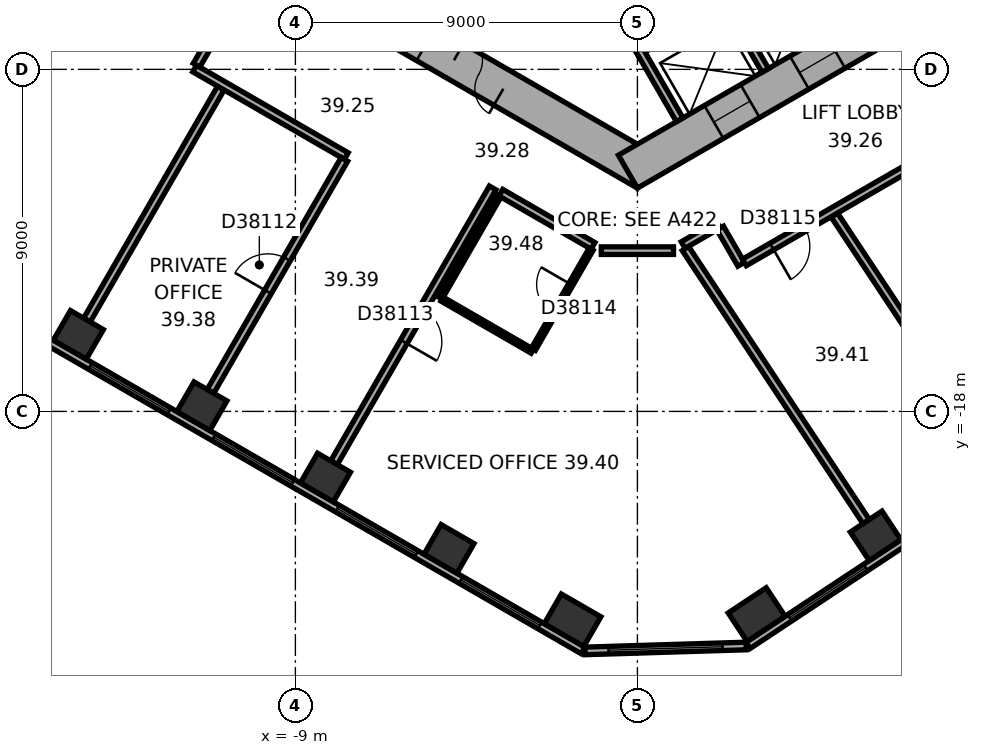
"""IFC4 building model, lengths in metres.
Left out: names, types, materials, properties, quantities, classifications, styles, units other than length and angle.
Written with IfcOpenShell. Run it as: python <this file> out.ifc"""

import sys

from ifc_helpers import new_model, si_unit, direction, frame, frame_2d, origin, origin_2d, place, context, subcontext, project, spatial, rectangle, extrude, element, fill, save


model = new_model("IFC4")
c1 = context("Model", 3, precision=1e-05, world=origin(), true_north=direction((0.0, 1.0)))
c2 = subcontext(c1, "Body", "Model", "MODEL_VIEW")
j1 = project(units=[si_unit("LENGTHUNIT", "METRE"), si_unit("PLANEANGLEUNIT", "RADIAN")], contexts=[c1])
p1 = place(None, origin())
s1 = spatial("IfcSite", under=j1, at=p1, CompositionType="ELEMENT")
p2 = place(p1, origin())
s2 = spatial("IfcBuilding", under=s1, at=p2, CompositionType="ELEMENT")
p3 = place(p2, frame((0.0, 0.0, 161.4)))
s3 = spatial("IfcBuildingStorey", under=s2, at=p3, CompositionType="ELEMENT", Elevation=161.4)
for number, where, z_axis, x_axis in (
    (1, (-14.711, -15.986, 0.0), (0.0, 0.0, 1.0), (0.866, -0.5, 0.0)),
    (2, (-11.46, -17.863, 0.0), (0.0, 0.0, 1.0), (0.866, -0.5, 0.0)),
    (3, (-8.208, -19.74, 0.0), (0.0, 0.0, 1.0), (0.866, -0.5, 0.0)),
    (4, (-4.958, -21.617, 0.0), (0.0, 0.0, 1.0), (0.866, -0.5, 0.0)),
):
    element("IfcColumn", number, at=place(p3, frame(where, z_axis=z_axis, x_axis=x_axis)), inside=s3, PredefinedType="COLUMN", context=c2, shape_type="SweptSolid", body=[
        extrude(rectangle(XDim=1.0, YDim=0.9, at=origin_2d()), origin(), (0.0, 0.0, 1.0), 3.7),
    ])
for number, where, z_axis, x_axis in (
    (5, (-1.706, -23.494, 0.0), (0.0, 0.0, 1.0), (0.866, -0.5, 0.0)),
    (6, (3.137, -23.346, 0.0), (0.0, 0.0, 1.0), (0.834, 0.552, 0.0)),
):
    element("IfcColumn", number, at=place(p3, frame(where, z_axis=z_axis, x_axis=x_axis)), inside=s3, PredefinedType="COLUMN", context=c2, shape_type="SweptSolid", body=[
        extrude(rectangle(XDim=1.2, YDim=0.9, at=origin_2d()), origin(), (0.0, 0.0, 1.0), 3.7),
    ])
p4 = place(p3, frame((6.268, -21.274, 0.0), z_axis=(0.0, 0.0, 1.0), x_axis=(0.833885822067, 0.551936985312, 0.0)))
e7 = element("IfcColumn", 7, at=p4, inside=s3, PredefinedType="COLUMN", context=c2, shape_type="SweptSolid", body=[
    extrude(rectangle(XDim=1.0, YDim=0.9, at=origin_2d()), origin(), (0.0, 0.0, 1.0), 3.7),
])
p5 = place(p3, frame((-10.25, -5.629, 0.0), z_axis=(0.0, 0.0, 1.0), x_axis=(0.866022616891, -0.50000482701, 0.0)))
e8 = element("IfcWall", 8, at=p5, inside=s3, PredefinedType="SHEAR", context=c2, shape_type="SweptSolid", body=[
    extrude(rectangle(XDim=12.125, YDim=1.0, at=frame_2d((6.062, 0.0))), origin(), (0.0, 0.0, 1.0), 3.7),
])
p6 = place(p5, frame((6.262, 0.0, 0.0)))
e9 = element("IfcOpeningElement", 9, at=p6, cuts=e8, PredefinedType="OPENING", context=c2, shape_type="SweptSolid", body=[
    extrude(rectangle(XDim=1.5, YDim=2.1, at=frame_2d((0.75, 1.05))), frame((0.0, 0.51, 0.0), z_axis=(0.0, -1.0, 0.0), x_axis=(1.0, 0.0, 0.0)), (0.0, 0.0, 1.0), 1.02),
])
p7 = place(p5, frame((1.712, 0.0, 0.0)))
e10 = element("IfcOpeningElement", 10, at=p7, cuts=e8, PredefinedType="OPENING", context=c2, shape_type="SweptSolid", body=[
    extrude(rectangle(XDim=1.1, YDim=2.1, at=frame_2d((0.55, 1.05))), frame((0.0, 0.51, 0.0), z_axis=(0.0, -1.0, 0.0), x_axis=(1.0, 0.0, 0.0)), (0.0, 0.0, 1.0), 1.02),
])
p8 = place(p5, frame((4.312, 0.0, 0.0)))
e11 = element("IfcOpeningElement", 11, at=p8, cuts=e8, PredefinedType="OPENING", context=c2, shape_type="SweptSolid", body=[
    extrude(rectangle(XDim=1.1, YDim=2.1, at=frame_2d((0.55, 1.05))), frame((0.0, 0.51, 0.0), z_axis=(0.0, -1.0, 0.0), x_axis=(1.0, 0.0, 0.0)), (0.0, 0.0, 1.0), 1.02),
])
p9 = place(p3, frame((-0.25, -11.691, 0.0), z_axis=(0.0, 0.0, 1.0), x_axis=(0.866022616891, 0.50000482701, 0.0)))
e12 = element("IfcWall", 12, at=p9, inside=s3, PredefinedType="SHEAR", context=c2, shape_type="SweptSolid", body=[
    extrude(rectangle(XDim=12.125, YDim=1.0, at=frame_2d((6.062, 0.0))), origin(), (0.0, 0.0, 1.0), 3.7),
])
p10 = place(p9, frame((2.612, 0.0, 0.0)))
e13 = element("IfcOpeningElement", 13, at=p10, cuts=e12, PredefinedType="OPENING", context=c2, shape_type="SweptSolid", body=[
    extrude(rectangle(XDim=1.1, YDim=2.1, at=frame_2d((0.55, 1.05))), frame((0.0, 0.51, 0.0), z_axis=(0.0, -1.0, 0.0), x_axis=(1.0, 0.0, 0.0)), (0.0, 0.0, 1.0), 1.02),
])
p11 = place(p9, frame((5.212, 0.0, 0.0)))
e14 = element("IfcOpeningElement", 14, at=p11, cuts=e12, PredefinedType="OPENING", context=c2, shape_type="SweptSolid", body=[
    extrude(rectangle(XDim=1.1, YDim=2.1, at=frame_2d((0.55, 1.05))), frame((0.0, 0.51, 0.0), z_axis=(0.0, -1.0, 0.0), x_axis=(1.0, 0.0, 0.0)), (0.0, 0.0, 1.0), 1.02),
])
p12 = place(p9, frame((7.812, 0.0, 0.0)))
e15 = element("IfcOpeningElement", 15, at=p12, cuts=e12, PredefinedType="OPENING", context=c2, shape_type="SweptSolid", body=[
    extrude(rectangle(XDim=1.1, YDim=2.1, at=frame_2d((0.55, 1.05))), frame((0.0, 0.51, 0.0), z_axis=(0.0, -1.0, 0.0), x_axis=(1.0, 0.0, 0.0)), (0.0, 0.0, 1.0), 1.02),
])
p13 = place(p3, frame((-18.789, -14.267, 0.0), z_axis=(0.0, 0.0, 1.0), x_axis=(0.866023315909, -0.500003616288, 0.0)))
e16 = element("IfcWall", 16, at=p13, inside=s3, PredefinedType="STANDARD", context=c2, shape_type="SweptSolid", body=[
    extrude(rectangle(XDim=20.044, YDim=0.2, at=frame_2d((10.022, 0.0))), origin(), (0.0, 0.0, 1.0), 3.7),
])
p14 = place(p13, frame((1.314, 0.0, 0.9)))
e17 = element("IfcOpeningElement", 17, at=p14, cuts=e16, PredefinedType="OPENING", context=c2, shape_type="SweptSolid", body=[
    extrude(rectangle(XDim=2.4, YDim=2.0, at=frame_2d((1.2, 1.0))), frame((0.0, 0.11, 0.0), z_axis=(0.0, -1.0, 0.0), x_axis=(1.0, 0.0, 0.0)), (0.0, 0.0, 1.0), 0.22),
])
p15 = place(p13, frame((5.069, 0.0, 0.9)))
e18 = element("IfcOpeningElement", 18, at=p15, cuts=e16, PredefinedType="OPENING", context=c2, shape_type="SweptSolid", body=[
    extrude(rectangle(XDim=2.4, YDim=2.0, at=frame_2d((1.2, 1.0))), frame((0.0, 0.11, 0.0), z_axis=(0.0, -1.0, 0.0), x_axis=(1.0, 0.0, 0.0)), (0.0, 0.0, 1.0), 0.22),
])
p16 = place(p13, frame((8.823, 0.0, 0.9)))
e19 = element("IfcOpeningElement", 19, at=p16, cuts=e16, PredefinedType="OPENING", context=c2, shape_type="SweptSolid", body=[
    extrude(rectangle(XDim=2.4, YDim=2.0, at=frame_2d((1.2, 1.0))), frame((0.0, 0.11, 0.0), z_axis=(0.0, -1.0, 0.0), x_axis=(1.0, 0.0, 0.0)), (0.0, 0.0, 1.0), 0.22),
])
p17 = place(p13, frame((12.577, 0.0, 0.9)))
e20 = element("IfcOpeningElement", 20, at=p17, cuts=e16, PredefinedType="OPENING", context=c2, shape_type="SweptSolid", body=[
    extrude(rectangle(XDim=2.4, YDim=2.0, at=frame_2d((1.2, 1.0))), frame((0.0, 0.11, 0.0), z_axis=(0.0, -1.0, 0.0), x_axis=(1.0, 0.0, 0.0)), (0.0, 0.0, 1.0), 0.22),
])
p18 = place(p13, frame((16.331, 0.0, 0.9)))
e21 = element("IfcOpeningElement", 21, at=p18, cuts=e16, PredefinedType="OPENING", context=c2, shape_type="SweptSolid", body=[
    extrude(rectangle(XDim=2.4, YDim=2.0, at=frame_2d((1.2, 1.0))), frame((0.0, 0.11, 0.0), z_axis=(0.0, -1.0, 0.0), x_axis=(1.0, 0.0, 0.0)), (0.0, 0.0, 1.0), 0.22),
])
p19 = place(p3, frame((-1.378, -24.302, 0.0), z_axis=(0.0, 0.0, 1.0), x_axis=(0.999533857267, 0.030529791629, 0.0)))
e22 = element("IfcWall", 22, at=p19, inside=s3, PredefinedType="STANDARD", context=c2, shape_type="SweptSolid", body=[
    extrude(rectangle(XDim=4.238, YDim=0.2, at=frame_2d((2.119, 0.0))), origin(), (0.0, 0.0, 1.0), 3.7),
])
p20 = place(p19, frame((0.619, 0.0, 0.9)))
e23 = element("IfcOpeningElement", 23, at=p20, cuts=e22, PredefinedType="OPENING", context=c2, shape_type="SweptSolid", body=[
    extrude(rectangle(XDim=3.0, YDim=2.0, at=frame_2d((1.5, 1.0))), frame((0.0, 0.11, 0.0), z_axis=(0.0, -1.0, 0.0), x_axis=(1.0, 0.0, 0.0)), (0.0, 0.0, 1.0), 0.22),
])
p21 = place(p3, frame((2.911, -24.156, 0.0), z_axis=(0.0, 0.0, 1.0), x_axis=(0.833882163564, 0.551942512668, 0.0)))
e24 = element("IfcWall", 24, at=p21, inside=s3, PredefinedType="STANDARD", context=c2, shape_type="SweptSolid", body=[
    extrude(rectangle(XDim=20.044, YDim=0.2, at=frame_2d((10.022, 0.0))), origin(), (0.0, 0.0, 1.0), 3.7),
])
p22 = place(p21, frame((1.313, 0.0, 0.9)))
e25 = element("IfcOpeningElement", 25, at=p22, cuts=e24, PredefinedType="OPENING", context=c2, shape_type="SweptSolid", body=[
    extrude(rectangle(XDim=2.4, YDim=2.0, at=frame_2d((1.2, 1.0))), frame((0.0, 0.11, 0.0), z_axis=(0.0, -1.0, 0.0), x_axis=(1.0, 0.0, 0.0)), (0.0, 0.0, 1.0), 0.22),
])
p23 = place(p21, frame((5.067, 0.0, 0.9)))
e26 = element("IfcOpeningElement", 26, at=p23, cuts=e24, PredefinedType="OPENING", context=c2, shape_type="SweptSolid", body=[
    extrude(rectangle(XDim=2.4, YDim=2.0, at=frame_2d((1.2, 1.0))), frame((0.0, 0.11, 0.0), z_axis=(0.0, -1.0, 0.0), x_axis=(1.0, 0.0, 0.0)), (0.0, 0.0, 1.0), 0.22),
])
p24 = place(p21, frame((8.821, 0.0, 0.9)))
e27 = element("IfcOpeningElement", 27, at=p24, cuts=e24, PredefinedType="OPENING", context=c2, shape_type="SweptSolid", body=[
    extrude(rectangle(XDim=2.4, YDim=2.0, at=frame_2d((1.2, 1.0))), frame((0.0, 0.11, 0.0), z_axis=(0.0, -1.0, 0.0), x_axis=(1.0, 0.0, 0.0)), (0.0, 0.0, 1.0), 0.22),
])
p25 = place(p21, frame((12.575, 0.0, 0.9)))
e28 = element("IfcOpeningElement", 28, at=p25, cuts=e24, PredefinedType="OPENING", context=c2, shape_type="SweptSolid", body=[
    extrude(rectangle(XDim=2.4, YDim=2.0, at=frame_2d((1.2, 1.0))), frame((0.0, 0.11, 0.0), z_axis=(0.0, -1.0, 0.0), x_axis=(1.0, 0.0, 0.0)), (0.0, 0.0, 1.0), 0.22),
])
p26 = place(p21, frame((16.329, 0.0, 0.9)))
e29 = element("IfcOpeningElement", 29, at=p26, cuts=e24, PredefinedType="OPENING", context=c2, shape_type="SweptSolid", body=[
    extrude(rectangle(XDim=2.4, YDim=2.0, at=frame_2d((1.2, 1.0))), frame((0.0, 0.11, 0.0), z_axis=(0.0, -1.0, 0.0), x_axis=(1.0, 0.0, 0.0)), (0.0, 0.0, 1.0), 0.22),
])
p27 = place(p3, frame((-0.024, -8.559, 0.0), z_axis=(0.0, 0.0, 1.0), x_axis=(0.866026010844, 0.49999894854, 0.0)))
e30 = element("IfcWall", 30, at=p27, inside=s3, PredefinedType="PARTITIONING", context=c2, shape_type="SweptSolid", body=[
    extrude(rectangle(XDim=8.0, YDim=0.2, at=frame_2d((4.0, 0.0))), origin(), (0.0, 0.0, 1.0), 3.42),
])
for number, where, z_axis, x_axis in (
    (31, (0.013, -8.422, 0.0), (0.0, 0.0, 1.0), (0.5, -0.866, 0.0)),
    (32, (2.264, -7.122, 0.0), (0.0, 0.0, 1.0), (0.5, -0.866, 0.0)),
):
    element("IfcWall", number, at=place(p3, frame(where, z_axis=z_axis, x_axis=x_axis)), inside=s3, PredefinedType="PARTITIONING", context=c2, shape_type="SweptSolid", body=[
        extrude(rectangle(XDim=2.2, YDim=0.2, at=frame_2d((1.1, 0.0))), origin(), (0.0, 0.0, 1.0), 3.42),
    ])
p28 = place(p3, frame((-14.486, -15.597, 0.0), z_axis=(0.0, 0.0, 1.0), x_axis=(0.499983284935, 0.866035054017, 0.0)))
e33 = element("IfcWall", 33, at=p28, inside=s3, PredefinedType="PARTITIONING", context=c2, shape_type="SweptSolid", body=[
    extrude(rectangle(XDim=7.049, YDim=0.2, at=frame_2d((3.524, 0.0))), origin(), (0.0, 0.0, 1.0), 3.42),
])
p29 = place(p3, frame((-11.651, -8.978, 0.0), z_axis=(0.0, 0.0, 1.0), x_axis=(0.866010893236, -0.500025132165, 0.0)))
e34 = element("IfcWall", 34, at=p29, inside=s3, PredefinedType="PARTITIONING", context=c2, shape_type="SweptSolid", body=[
    extrude(rectangle(XDim=4.608, YDim=0.2, at=frame_2d((2.304, 0.0))), origin(), (0.0, 0.0, 1.0), 3.42),
])
p30 = place(p3, frame((-11.235, -17.474, 0.0), z_axis=(0.0, 0.0, 1.0), x_axis=(0.500009260695, 0.866020057054, 0.0)))
e35 = element("IfcWall", 35, at=p30, inside=s3, PredefinedType="PARTITIONING", context=c2, shape_type="SweptSolid", body=[
    extrude(rectangle(XDim=7.049, YDim=0.2, at=frame_2d((3.524, 0.0))), origin(), (0.0, 0.0, 1.0), 2.87),
])
p31 = place(p30, frame((3.024, 0.0, 0.0)))
e36 = element("IfcOpeningElement", 36, at=p31, cuts=e35, PredefinedType="OPENING", context=c2, shape_type="SweptSolid", body=[
    extrude(rectangle(XDim=1.0, YDim=2.1, at=frame_2d((0.5, 1.05))), frame((0.0, 0.11, 0.0), z_axis=(0.0, -1.0, 0.0), x_axis=(1.0, 0.0, 0.0)), (0.0, 0.0, 1.0), 0.22),
])
p32 = place(p3, frame((-11.101, -8.025, 0.0), z_axis=(0.0, 0.0, 1.0), x_axis=(-0.500074377092, -0.865982457891, 0.0)))
e37 = element("IfcWall", 37, at=p32, inside=s3, PredefinedType="PARTITIONING", context=c2, shape_type="SweptSolid", body=[
    extrude(rectangle(XDim=1.001, YDim=0.2, at=frame_2d((0.5, 0.0))), origin(), (0.0, 0.0, 1.0), 3.42),
])
p33 = place(p3, frame((-7.984, -19.351, 0.0), z_axis=(0.0, 0.0, 1.0), x_axis=(0.500010139422, 0.866019549707, 0.0)))
e38 = element("IfcWall", 38, at=p33, inside=s3, PredefinedType="PARTITIONING", context=c2, shape_type="SweptSolid", body=[
    extrude(rectangle(XDim=8.35, YDim=0.2, at=frame_2d((4.175, 0.0))), origin(), (0.0, 0.0, 1.0), 3.42),
])
p34 = place(p33, frame((3.675, 0.0, 0.0)))
e39 = element("IfcOpeningElement", 39, at=p34, cuts=e38, PredefinedType="OPENING", context=c2, shape_type="SweptSolid", body=[
    extrude(rectangle(XDim=1.0, YDim=2.1, at=frame_2d((0.5, 1.05))), frame((0.0, 0.11, 0.0), z_axis=(0.0, -1.0, 0.0), x_axis=(1.0, 0.0, 0.0)), (0.0, 0.0, 1.0), 0.22),
])
p35 = place(p3, frame((-5.192, -15.016, 0.0), z_axis=(0.0, 0.0, 1.0), x_axis=(0.500026960575, 0.86600983753, 0.0)))
e40 = element("IfcWall", 40, at=p35, inside=s3, PredefinedType="PARTITIONING", context=c2, shape_type="SweptSolid", body=[
    extrude(rectangle(XDim=3.1, YDim=0.12, at=frame_2d((1.55, 0.0))), origin(), (0.0, 0.0, 1.0), 3.42),
])
p36 = place(p3, frame((-3.592, -12.244, 0.0), z_axis=(0.0, 0.0, 1.0), x_axis=(0.866034573852, -0.49998411664, 0.0)))
e41 = element("IfcWall", 41, at=p36, inside=s3, PredefinedType="PARTITIONING", context=c2, shape_type="SweptSolid", body=[
    extrude(rectangle(XDim=2.8, YDim=0.2, at=frame_2d((1.4, 0.0))), origin(), (0.0, 0.0, 1.0), 3.42),
])
p37 = place(p3, frame((-2.767, -16.416, 0.0), z_axis=(0.0, 0.0, 1.0), x_axis=(-0.865997131366, 0.500048966069, 0.0)))
e42 = element("IfcWall", 42, at=p37, inside=s3, PredefinedType="PARTITIONING", context=c2, shape_type="SweptSolid", body=[
    extrude(rectangle(XDim=2.74, YDim=0.12, at=frame_2d((1.37, 0.0))), origin(), (0.0, 0.0, 1.0), 3.42),
])
p38 = place(p3, frame((-1.217, -13.731, 0.0), z_axis=(0.0, 0.0, 1.0), x_axis=(-0.499991248344, -0.866030456496, 0.0)))
e43 = element("IfcWall", 43, at=p38, inside=s3, PredefinedType="PARTITIONING", context=c2, shape_type="SweptSolid", body=[
    extrude(rectangle(XDim=3.04, YDim=0.12, at=frame_2d((1.52, 0.0))), origin(), (0.0, 0.0, 1.0), 3.42),
])
p39 = place(p38, frame((1.07, 0.0, 0.0)))
e44 = element("IfcOpeningElement", 44, at=p39, cuts=e43, PredefinedType="OPENING", context=c2, shape_type="SweptSolid", body=[
    extrude(rectangle(XDim=0.9, YDim=2.1, at=frame_2d((0.45, 1.05))), frame((0.0, 0.07, 0.0), z_axis=(0.0, -1.0, 0.0), x_axis=(1.0, 0.0, 0.0)), (0.0, 0.0, 1.0), 0.14),
])
p40 = place(p3, frame((-0.95, -13.77, 0.0), z_axis=(0.0, 0.0, 1.0), x_axis=(1.0, 0.0, 0.0)))
e45 = element("IfcWall", 45, at=p40, inside=s3, PredefinedType="PARTITIONING", context=c2, shape_type="SweptSolid", body=[
    extrude(rectangle(XDim=1.9, YDim=0.2, at=frame_2d((0.95, 0.0))), origin(), (0.0, 0.0, 1.0), 3.42),
])
p41 = place(p3, frame((1.204, -13.623, 0.0), z_axis=(0.0, 0.0, 1.0), x_axis=(0.866040989419, 0.499973003918, 0.0)))
e46 = element("IfcWall", 46, at=p41, inside=s3, PredefinedType="PARTITIONING", context=c2, shape_type="SweptSolid", body=[
    extrude(rectangle(XDim=1.068, YDim=0.2, at=frame_2d((0.534, 0.0))), origin(), (0.0, 0.0, 1.0), 3.42),
])
p42 = place(p3, frame((2.179, -13.176, 0.0), z_axis=(0.0, 0.0, 1.0), x_axis=(0.499978356969, -0.866037899034, 0.0)))
e47 = element("IfcWall", 47, at=p42, inside=s3, PredefinedType="PARTITIONING", context=c2, shape_type="SweptSolid", body=[
    extrude(rectangle(XDim=1.101, YDim=0.2, at=frame_2d((0.551, 0.0))), origin(), (0.0, 0.0, 1.0), 3.42),
])
p43 = place(p3, frame((2.816, -14.079, 0.0), z_axis=(0.0, 0.0, 1.0), x_axis=(0.866021128829, 0.500007404367, 0.0)))
e48 = element("IfcWall", 48, at=p43, inside=s3, PredefinedType="PARTITIONING", context=c2, shape_type="SweptSolid", body=[
    extrude(rectangle(XDim=8.702, YDim=0.2, at=frame_2d((4.351, 0.0))), origin(), (0.0, 0.0, 1.0), 3.42),
])
p44 = place(p43, frame((0.833, 0.0, 0.0)))
e49 = element("IfcOpeningElement", 49, at=p44, cuts=e48, PredefinedType="OPENING", context=c2, shape_type="SweptSolid", body=[
    extrude(rectangle(XDim=1.0, YDim=2.1, at=frame_2d((0.5, 1.05))), frame((0.0, 0.11, 0.0), z_axis=(0.0, -1.0, 0.0), x_axis=(1.0, 0.0, 0.0)), (0.0, 0.0, 1.0), 0.22),
])
p45 = place(p3, frame((6.02, -20.899, 0.0), z_axis=(0.0, 0.0, 1.0), x_axis=(-0.551943990108, 0.833881185651, 0.0)))
e50 = element("IfcWall", 50, at=p45, inside=s3, PredefinedType="PARTITIONING", context=c2, shape_type="SweptSolid", body=[
    extrude(rectangle(XDim=8.615, YDim=0.2, at=frame_2d((4.308, 0.0))), origin(), (0.0, 0.0, 1.0), 3.42),
])
p46 = place(p3, frame((9.15, -18.827, 0.0), z_axis=(0.0, 0.0, 1.0), x_axis=(-0.551928083938, 0.83389171369, 0.0)))
e51 = element("IfcWall", 51, at=p46, inside=s3, PredefinedType="PARTITIONING", context=c2, shape_type="SweptSolid", body=[
    extrude(rectangle(XDim=7.182, YDim=0.2, at=frame_2d((3.591, 0.0))), origin(), (0.0, 0.0, 1.0), 2.87),
])
p47 = place(p15, origin())
e52 = element("IfcWindow", 52, at=p47, inside=s3, PartitioningType="SINGLE_PANEL", PredefinedType="WINDOW", context=c2, shape_type="SweptSolid", body=[
    extrude(rectangle(XDim=2.4, YDim=2.0, at=frame_2d((1.2, 1.0))), frame((0.0, 0.03, 0.0), z_axis=(0.0, -1.0, 0.0), x_axis=(1.0, 0.0, 0.0)), (0.0, 0.0, 1.0), 0.06),
])
fill(e18, e52)
p48 = place(p16, origin())
e53 = element("IfcWindow", 53, at=p48, inside=s3, PartitioningType="SINGLE_PANEL", PredefinedType="WINDOW", context=c2, shape_type="SweptSolid", body=[
    extrude(rectangle(XDim=2.4, YDim=2.0, at=frame_2d((1.2, 1.0))), frame((0.0, 0.03, 0.0), z_axis=(0.0, -1.0, 0.0), x_axis=(1.0, 0.0, 0.0)), (0.0, 0.0, 1.0), 0.06),
])
fill(e19, e53)
p49 = place(p17, origin())
e54 = element("IfcWindow", 54, at=p49, inside=s3, PartitioningType="SINGLE_PANEL", PredefinedType="WINDOW", context=c2, shape_type="SweptSolid", body=[
    extrude(rectangle(XDim=2.4, YDim=2.0, at=frame_2d((1.2, 1.0))), frame((0.0, 0.03, 0.0), z_axis=(0.0, -1.0, 0.0), x_axis=(1.0, 0.0, 0.0)), (0.0, 0.0, 1.0), 0.06),
])
fill(e20, e54)
p50 = place(p18, origin())
e55 = element("IfcWindow", 55, at=p50, inside=s3, PartitioningType="SINGLE_PANEL", PredefinedType="WINDOW", context=c2, shape_type="SweptSolid", body=[
    extrude(rectangle(XDim=2.4, YDim=2.0, at=frame_2d((1.2, 1.0))), frame((0.0, 0.03, 0.0), z_axis=(0.0, -1.0, 0.0), x_axis=(1.0, 0.0, 0.0)), (0.0, 0.0, 1.0), 0.06),
])
fill(e21, e55)
p51 = place(p20, origin())
e56 = element("IfcWindow", 56, at=p51, inside=s3, PartitioningType="SINGLE_PANEL", PredefinedType="WINDOW", context=c2, shape_type="SweptSolid", body=[
    extrude(rectangle(XDim=3.0, YDim=2.0, at=frame_2d((1.5, 1.0))), frame((0.0, 0.03, 0.0), z_axis=(0.0, -1.0, 0.0), x_axis=(1.0, 0.0, 0.0)), (0.0, 0.0, 1.0), 0.06),
])
fill(e23, e56)
p52 = place(p22, origin())
e57 = element("IfcWindow", 57, at=p52, inside=s3, PartitioningType="SINGLE_PANEL", PredefinedType="WINDOW", context=c2, shape_type="SweptSolid", body=[
    extrude(rectangle(XDim=2.4, YDim=2.0, at=frame_2d((1.2, 1.0))), frame((0.0, 0.03, 0.0), z_axis=(0.0, -1.0, 0.0), x_axis=(1.0, 0.0, 0.0)), (0.0, 0.0, 1.0), 0.06),
])
fill(e25, e57)
p53 = place(p6, origin())
e58 = element("IfcDoor", 58, at=p53, inside=s3, OperationType="DOUBLE_DOOR_SINGLE_SWING", PredefinedType="DOOR", context=c2, shape_type="SweptSolid", body=[
    extrude(rectangle(XDim=1.5, YDim=2.1, at=frame_2d((0.75, 1.05))), frame((0.0, 0.025, 0.0), z_axis=(0.0, -1.0, 0.0), x_axis=(1.0, 0.0, 0.0)), (0.0, 0.0, 1.0), 0.05),
])
fill(e9, e58)
p54 = place(p10, origin())
e59 = element("IfcDoor", 59, at=p54, inside=s3, OperationType="DOUBLE_DOOR_SLIDING", PredefinedType="DOOR", context=c2, shape_type="SweptSolid", body=[
    extrude(rectangle(XDim=1.1, YDim=2.1, at=frame_2d((0.55, 1.05))), frame((0.0, 0.025, 0.0), z_axis=(0.0, -1.0, 0.0), x_axis=(1.0, 0.0, 0.0)), (0.0, 0.0, 1.0), 0.05),
])
fill(e13, e59)
p55 = place(p11, origin())
e60 = element("IfcDoor", 60, at=p55, inside=s3, OperationType="DOUBLE_DOOR_SLIDING", PredefinedType="DOOR", context=c2, shape_type="SweptSolid", body=[
    extrude(rectangle(XDim=1.1, YDim=2.1, at=frame_2d((0.55, 1.05))), frame((0.0, 0.025, 0.0), z_axis=(0.0, -1.0, 0.0), x_axis=(1.0, 0.0, 0.0)), (0.0, 0.0, 1.0), 0.05),
])
fill(e14, e60)
p56 = place(p31, origin())
e61 = element("IfcDoor", 61, at=p56, inside=s3, OperationType="SINGLE_SWING_LEFT", PredefinedType="DOOR", context=c2, shape_type="SweptSolid", body=[
    extrude(rectangle(XDim=1.0, YDim=2.1, at=frame_2d((0.5, 1.05))), frame((0.0, 0.025, 0.0), z_axis=(0.0, -1.0, 0.0), x_axis=(1.0, 0.0, 0.0)), (0.0, 0.0, 1.0), 0.05),
])
fill(e36, e61)
p57 = place(p34, origin())
e62 = element("IfcDoor", 62, at=p57, inside=s3, OperationType="SINGLE_SWING_LEFT", PredefinedType="DOOR", context=c2, shape_type="SweptSolid", body=[
    extrude(rectangle(XDim=1.0, YDim=2.1, at=frame_2d((0.5, 1.05))), frame((0.0, 0.025, 0.0), z_axis=(0.0, -1.0, 0.0), x_axis=(1.0, 0.0, 0.0)), (0.0, 0.0, 1.0), 0.05),
])
fill(e39, e62)
p58 = place(p39, origin())
e63 = element("IfcDoor", 63, at=p58, inside=s3, OperationType="SINGLE_SWING_LEFT", PredefinedType="DOOR", context=c2, shape_type="SweptSolid", body=[
    extrude(rectangle(XDim=0.9, YDim=2.1, at=frame_2d((0.45, 1.05))), frame((0.0, 0.025, 0.0), z_axis=(0.0, -1.0, 0.0), x_axis=(1.0, 0.0, 0.0)), (0.0, 0.0, 1.0), 0.05),
])
fill(e44, e63)
p59 = place(p44, origin())
e64 = element("IfcDoor", 64, at=p59, inside=s3, OperationType="SINGLE_SWING_LEFT", PredefinedType="DOOR", context=c2, shape_type="SweptSolid", body=[
    extrude(rectangle(XDim=1.0, YDim=2.1, at=frame_2d((0.5, 1.05))), frame((0.0, 0.025, 0.0), z_axis=(0.0, -1.0, 0.0), x_axis=(1.0, 0.0, 0.0)), (0.0, 0.0, 1.0), 0.05),
])
fill(e49, e64)
save(model, sys.argv[1])
